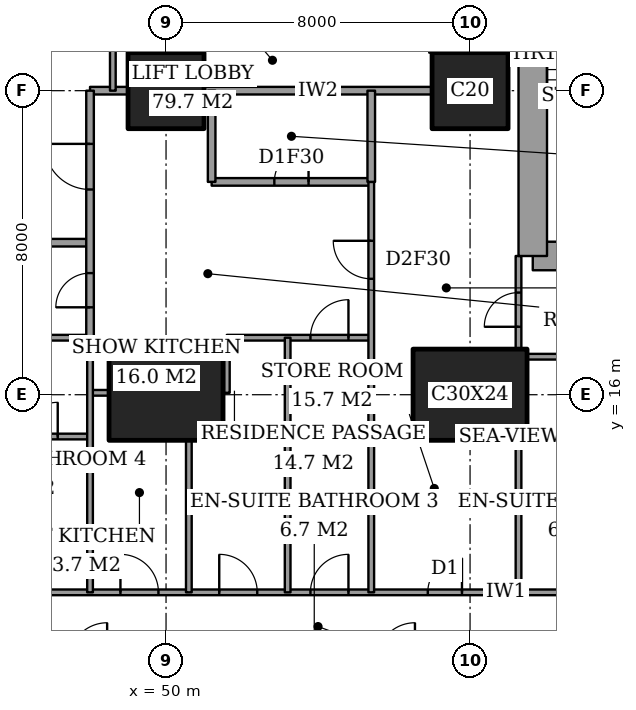
"""IFC4 building model, lengths in metres.
Left out: names, types, materials, properties, quantities, classifications, styles, units other than length and angle.
Written with IfcOpenShell. Run it as: python <this file> out.ifc"""

import sys

from ifc_helpers import new_model, si_unit, direction, frame, frame_2d, origin, origin_2d, place, context, subcontext, project, spatial, rectangle, extrude, element, fill, save


model = new_model("IFC4")
c1 = context("Model", 3, precision=1e-05, world=origin(), true_north=direction((0.0, 1.0)))
c2 = subcontext(c1, "Body", "Model", "MODEL_VIEW")
j1 = project(units=[si_unit("LENGTHUNIT", "METRE"), si_unit("PLANEANGLEUNIT", "RADIAN")], contexts=[c1])
p1 = place(None, origin())
s1 = spatial("IfcSite", under=j1, at=p1, CompositionType="ELEMENT")
p2 = place(p1, origin())
s2 = spatial("IfcBuilding", under=s1, at=p2, CompositionType="ELEMENT")
p3 = place(p2, frame((0.0, 0.0, 125.0)))
s3 = spatial("IfcBuildingStorey", under=s2, at=p3, CompositionType="ELEMENT", Elevation=125.0)
p4 = place(p3, frame((50.0, 16.0, 0.0), z_axis=(0.0, 0.0, 1.0), x_axis=(1.0, 0.0, 0.0)))
e1 = element("IfcColumn", 1, at=p4, inside=s3, PredefinedType="COLUMN", context=c2, shape_type="SweptSolid", body=[
    extrude(rectangle(XDim=3.0, YDim=2.4, at=origin_2d()), origin(), (0.0, 0.0, 1.0), 3.6),
])
p5 = place(p3, frame((50.0, 24.0, 0.0), z_axis=(0.0, 0.0, 1.0), x_axis=(1.0, 0.0, 0.0)))
e2 = element("IfcColumn", 2, at=p5, inside=s3, PredefinedType="COLUMN", context=c2, shape_type="SweptSolid", body=[
    extrude(rectangle(XDim=2.0, YDim=2.0, at=origin_2d()), origin(), (0.0, 0.0, 1.0), 3.6),
])
p6 = place(p3, frame((58.0, 16.0, 0.0), z_axis=(0.0, 0.0, 1.0), x_axis=(1.0, 0.0, 0.0)))
e3 = element("IfcColumn", 3, at=p6, inside=s3, PredefinedType="COLUMN", context=c2, shape_type="SweptSolid", body=[
    extrude(rectangle(XDim=3.0, YDim=2.4, at=origin_2d()), origin(), (0.0, 0.0, 1.0), 3.6),
])
p7 = place(p3, frame((58.0, 24.0, 0.0), z_axis=(0.0, 0.0, 1.0), x_axis=(1.0, 0.0, 0.0)))
e4 = element("IfcColumn", 4, at=p7, inside=s3, PredefinedType="COLUMN", context=c2, shape_type="SweptSolid", body=[
    extrude(rectangle(XDim=2.0, YDim=2.0, at=origin_2d()), origin(), (0.0, 0.0, 1.0), 3.6),
])
p8 = place(p3, frame((59.65, 19.65, 0.0), z_axis=(0.0, 0.0, 1.0), x_axis=(1.0, 0.0, 0.0)))
e5 = element("IfcWall", 5, at=p8, inside=s3, PredefinedType="SHEAR", context=c2, shape_type="SweptSolid", body=[
    extrude(rectangle(XDim=4.45, YDim=0.75, at=frame_2d((2.225, 0.0))), origin(), (0.0, 0.0, 1.0), 3.6),
])
p9 = place(p3, frame((59.65, 28.35, 0.0), z_axis=(0.0, 0.0, 1.0), x_axis=(0.0, -1.0, 0.0)))
e6 = element("IfcWall", 6, at=p9, inside=s3, PredefinedType="SHEAR", context=c2, shape_type="SweptSolid", body=[
    extrude(rectangle(XDim=8.7, YDim=0.75, at=frame_2d((4.35, 0.0))), origin(), (0.0, 0.0, 1.0), 3.6),
])
p10 = place(p9, frame((0.975, 0.0, 0.0)))
e7 = element("IfcOpeningElement", 7, at=p10, cuts=e6, PredefinedType="OPENING", context=c2, shape_type="SweptSolid", body=[
    extrude(rectangle(XDim=1.0, YDim=2.1, at=frame_2d((0.5, 1.05))), frame((0.0, 0.385, 0.0), z_axis=(0.0, -1.0, 0.0), x_axis=(1.0, 0.0, 0.0)), (0.0, 0.0, 1.0), 0.77),
])
p11 = place(p3, frame((41.439, 10.8, 0.0), z_axis=(0.0, 0.0, 1.0), x_axis=(1.0, 0.0, 0.0)))
e8 = element("IfcWall", 8, at=p11, inside=s3, PredefinedType="PARTITIONING", context=c2, shape_type="SweptSolid", body=[
    extrude(rectangle(XDim=25.011, YDim=0.15, at=frame_2d((12.505, 0.0))), origin(), (0.0, 0.0, 1.0), 3.35),
])
p12 = place(p11, frame((12.361, 0.0, 0.0)))
e9 = element("IfcOpeningElement", 9, at=p12, cuts=e8, PredefinedType="OPENING", context=c2, shape_type="SweptSolid", body=[
    extrude(rectangle(XDim=1.0, YDim=2.1, at=frame_2d((0.5, 1.05))), frame((0.0, 0.085, 0.0), z_axis=(0.0, -1.0, 0.0), x_axis=(1.0, 0.0, 0.0)), (0.0, 0.0, 1.0), 0.17),
])
p13 = place(p11, frame((20.924, 0.0, 0.0)))
e10 = element("IfcOpeningElement", 10, at=p13, cuts=e8, PredefinedType="OPENING", context=c2, shape_type="SweptSolid", body=[
    extrude(rectangle(XDim=1.0, YDim=2.1, at=frame_2d((0.5, 1.05))), frame((0.0, 0.085, 0.0), z_axis=(0.0, -1.0, 0.0), x_axis=(1.0, 0.0, 0.0)), (0.0, 0.0, 1.0), 0.17),
])
p14 = place(p11, frame((15.448, 0.0, 0.0)))
e11 = element("IfcOpeningElement", 11, at=p14, cuts=e8, PredefinedType="OPENING", context=c2, shape_type="SweptSolid", body=[
    extrude(rectangle(XDim=0.9, YDim=2.1, at=frame_2d((0.45, 1.05))), frame((0.0, 0.085, 0.0), z_axis=(0.0, -1.0, 0.0), x_axis=(1.0, 0.0, 0.0)), (0.0, 0.0, 1.0), 0.17),
])
p15 = place(p11, frame((9.961, 0.0, 0.0)))
e12 = element("IfcOpeningElement", 12, at=p15, cuts=e8, PredefinedType="OPENING", context=c2, shape_type="SweptSolid", body=[
    extrude(rectangle(XDim=1.0, YDim=2.1, at=frame_2d((0.5, 1.05))), frame((0.0, 0.085, 0.0), z_axis=(0.0, -1.0, 0.0), x_axis=(1.0, 0.0, 0.0)), (0.0, 0.0, 1.0), 0.17),
])
p16 = place(p11, frame((7.361, 0.0, 0.0)))
e13 = element("IfcOpeningElement", 13, at=p16, cuts=e8, PredefinedType="OPENING", context=c2, shape_type="SweptSolid", body=[
    extrude(rectangle(XDim=1.0, YDim=2.1, at=frame_2d((0.5, 1.05))), frame((0.0, 0.085, 0.0), z_axis=(0.0, -1.0, 0.0), x_axis=(1.0, 0.0, 0.0)), (0.0, 0.0, 1.0), 0.17),
])
p17 = place(p11, frame((2.836, 0.0, 0.0)))
e14 = element("IfcOpeningElement", 14, at=p17, cuts=e8, PredefinedType="OPENING", context=c2, shape_type="SweptSolid", body=[
    extrude(rectangle(XDim=1.0, YDim=2.1, at=frame_2d((0.5, 1.05))), frame((0.0, 0.085, 0.0), z_axis=(0.0, -1.0, 0.0), x_axis=(1.0, 0.0, 0.0)), (0.0, 0.0, 1.0), 0.17),
])
p18 = place(p3, frame((45.4, 14.9, 0.0), z_axis=(0.0, 0.0, 1.0), x_axis=(1.0, 0.0, 0.0)))
e15 = element("IfcWall", 15, at=p18, inside=s3, PredefinedType="PARTITIONING", context=c2, shape_type="SweptSolid", body=[
    extrude(rectangle(XDim=2.6, YDim=0.15, at=frame_2d((1.3, 0.0))), origin(), (0.0, 0.0, 1.0), 3.35),
])
p19 = place(p18, frame((0.85, 0.0, 0.0)))
e16 = element("IfcOpeningElement", 16, at=p19, cuts=e15, PredefinedType="OPENING", context=c2, shape_type="SweptSolid", body=[
    extrude(rectangle(XDim=0.9, YDim=2.1, at=frame_2d((0.45, 1.05))), frame((0.0, 0.085, 0.0), z_axis=(0.0, -1.0, 0.0), x_axis=(1.0, 0.0, 0.0)), (0.0, 0.0, 1.0), 0.17),
])
p20 = place(p3, frame((55.4, 15.0, 0.0), z_axis=(0.0, 0.0, 1.0), x_axis=(1.0, 0.0, 0.0)))
e17 = element("IfcWall", 17, at=p20, inside=s3, PredefinedType="PARTITIONING", context=c2, shape_type="SweptSolid", body=[
    extrude(rectangle(XDim=1.1, YDim=0.15, at=frame_2d((0.55, 0.0))), origin(), (0.0, 0.0, 1.0), 3.35),
])
p21 = place(p3, frame((48.0, 16.05, 0.0), z_axis=(0.0, 0.0, 1.0), x_axis=(1.0, 0.0, 0.0)))
e18 = element("IfcWall", 18, at=p21, inside=s3, PredefinedType="PARTITIONING", context=c2, shape_type="SweptSolid", body=[
    extrude(rectangle(XDim=0.5, YDim=0.15, at=frame_2d((0.25, 0.0))), origin(), (0.0, 0.0, 1.0), 2.634),
])
p22 = place(p3, frame((59.5, 17.0, 0.0), z_axis=(0.0, 0.0, 1.0), x_axis=(1.0, 0.0, 0.0)))
e19 = element("IfcWall", 19, at=p22, inside=s3, PredefinedType="PARTITIONING", context=c2, shape_type="SweptSolid", body=[
    extrude(rectangle(XDim=5.15, YDim=0.15, at=frame_2d((2.575, 0.0))), origin(), (0.0, 0.0, 1.0), 3.35),
])
p23 = place(p3, frame((42.0, 17.5, 0.0), z_axis=(0.0, 0.0, 1.0), x_axis=(1.0, 0.0, 0.0)))
e20 = element("IfcWall", 20, at=p23, inside=s3, PredefinedType="PARTITIONING", context=c2, shape_type="SweptSolid", body=[
    extrude(rectangle(XDim=6.0, YDim=0.15, at=frame_2d((3.0, 0.0))), origin(), (0.0, 0.0, 1.0), 3.35),
])
p24 = place(p3, frame((51.6, 17.5, 0.0), z_axis=(0.0, 0.0, 1.0), x_axis=(1.0, 0.0, 0.0)))
e21 = element("IfcWall", 21, at=p24, inside=s3, PredefinedType="PARTITIONING", context=c2, shape_type="SweptSolid", body=[
    extrude(rectangle(XDim=3.8, YDim=0.15, at=frame_2d((1.9, 0.0))), origin(), (0.0, 0.0, 1.0), 3.35),
])
p25 = place(p24, frame((2.2, 0.0, 0.0)))
e22 = element("IfcOpeningElement", 22, at=p25, cuts=e21, PredefinedType="OPENING", context=c2, shape_type="SweptSolid", body=[
    extrude(rectangle(XDim=1.0, YDim=2.1, at=frame_2d((0.5, 1.05))), frame((0.0, 0.085, 0.0), z_axis=(0.0, -1.0, 0.0), x_axis=(1.0, 0.0, 0.0)), (0.0, 0.0, 1.0), 0.17),
])
p26 = place(p3, frame((42.0, 20.0, 0.0), z_axis=(0.0, 0.0, 1.0), x_axis=(1.0, 0.0, 0.0)))
e23 = element("IfcWall", 23, at=p26, inside=s3, PredefinedType="PARTITIONING", context=c2, shape_type="SweptSolid", body=[
    extrude(rectangle(XDim=6.0, YDim=0.2, at=frame_2d((3.0, 0.0))), origin(), (0.0, 0.0, 1.0), 3.35),
])
p27 = place(p3, frame((51.2, 21.6, 0.0), z_axis=(0.0, 0.0, 1.0), x_axis=(1.0, 0.0, 0.0)))
e24 = element("IfcWall", 24, at=p27, inside=s3, PredefinedType="PARTITIONING", context=c2, shape_type="SweptSolid", body=[
    extrude(rectangle(XDim=4.2, YDim=0.2, at=frame_2d((2.1, 0.0))), origin(), (0.0, 0.0, 1.0), 3.35),
])
p28 = place(p27, frame((1.65, 0.0, 0.0)))
e25 = element("IfcOpeningElement", 25, at=p28, cuts=e24, PredefinedType="OPENING", context=c2, shape_type="SweptSolid", body=[
    extrude(rectangle(XDim=0.9, YDim=2.1, at=frame_2d((0.45, 1.05))), frame((0.0, 0.11, 0.0), z_axis=(0.0, -1.0, 0.0), x_axis=(1.0, 0.0, 0.0)), (0.0, 0.0, 1.0), 0.22),
])
p29 = place(p3, frame((48.0, 24.0, 0.0), z_axis=(0.0, 0.0, 1.0), x_axis=(1.0, 0.0, 0.0)))
e26 = element("IfcWall", 26, at=p29, inside=s3, PredefinedType="PARTITIONING", context=c2, shape_type="SweptSolid", body=[
    extrude(rectangle(XDim=1.0, YDim=0.2, at=frame_2d((0.5, 0.0))), origin(), (0.0, 0.0, 1.0), 3.35),
])
p30 = place(p3, frame((51.0, 24.0, 0.0), z_axis=(0.0, 0.0, 1.0), x_axis=(1.0, 0.0, 0.0)))
e27 = element("IfcWall", 27, at=p30, inside=s3, PredefinedType="PARTITIONING", context=c2, shape_type="SweptSolid", body=[
    extrude(rectangle(XDim=6.0, YDim=0.2, at=frame_2d((3.0, 0.0))), origin(), (0.0, 0.0, 1.0), 3.35),
])
p31 = place(p3, frame((48.0, 17.5, 0.0), z_axis=(0.0, 0.0, 1.0), x_axis=(0.0, 1.0, 0.0)))
e28 = element("IfcWall", 28, at=p31, inside=s3, PredefinedType="PARTITIONING", context=c2, shape_type="SweptSolid", body=[
    extrude(rectangle(XDim=6.5, YDim=0.2, at=frame_2d((3.25, 0.0))), origin(), (0.0, 0.0, 1.0), 3.35),
])
p32 = place(p31, frame((3.9, 0.0, 0.0)))
e29 = element("IfcOpeningElement", 29, at=p32, cuts=e28, PredefinedType="OPENING", context=c2, shape_type="SweptSolid", body=[
    extrude(rectangle(XDim=1.2, YDim=2.4, at=frame_2d((0.6, 1.2))), frame((0.0, 0.11, 0.0), z_axis=(0.0, -1.0, 0.0), x_axis=(1.0, 0.0, 0.0)), (0.0, 0.0, 1.0), 0.22),
])
p33 = place(p31, frame((0.8, 0.0, 0.0)))
e30 = element("IfcOpeningElement", 30, at=p33, cuts=e28, PredefinedType="OPENING", context=c2, shape_type="SweptSolid", body=[
    extrude(rectangle(XDim=0.9, YDim=2.1, at=frame_2d((0.45, 1.05))), frame((0.0, 0.11, 0.0), z_axis=(0.0, -1.0, 0.0), x_axis=(1.0, 0.0, 0.0)), (0.0, 0.0, 1.0), 0.22),
])
p34 = place(p3, frame((48.0, 10.8, 0.0), z_axis=(0.0, 0.0, 1.0), x_axis=(0.0, 1.0, 0.0)))
e31 = element("IfcWall", 31, at=p34, inside=s3, PredefinedType="PARTITIONING", context=c2, shape_type="SweptSolid", body=[
    extrude(rectangle(XDim=6.7, YDim=0.15, at=frame_2d((3.35, 0.0))), origin(), (0.0, 0.0, 1.0), 3.35),
])
p35 = place(p3, frame((48.6, 24.0, 0.0), z_axis=(0.0, 0.0, 1.0), x_axis=(0.0, 1.0, 0.0)))
e32 = element("IfcWall", 32, at=p35, inside=s3, PredefinedType="PARTITIONING", context=c2, shape_type="SweptSolid", body=[
    extrude(rectangle(XDim=1.6, YDim=0.15, at=frame_2d((0.8, 0.0))), origin(), (0.0, 0.0, 1.0), 3.35),
])
p36 = place(p3, frame((50.6, 10.8, 0.0), z_axis=(0.0, 0.0, 1.0), x_axis=(0.0, 1.0, 0.0)))
e33 = element("IfcWall", 33, at=p36, inside=s3, PredefinedType="PARTITIONING", context=c2, shape_type="SweptSolid", body=[
    extrude(rectangle(XDim=4.0, YDim=0.15, at=frame_2d((2.0, 0.0))), origin(), (0.0, 0.0, 1.0), 3.35),
])
p37 = place(p3, frame((51.2, 21.6, 0.0), z_axis=(0.0, 0.0, 1.0), x_axis=(0.0, 1.0, 0.0)))
e34 = element("IfcWall", 34, at=p37, inside=s3, PredefinedType="PARTITIONING", context=c2, shape_type="SweptSolid", body=[
    extrude(rectangle(XDim=2.4, YDim=0.2, at=frame_2d((1.2, 0.0))), origin(), (0.0, 0.0, 1.0), 3.35),
])
p38 = place(p3, frame((51.6, 16.05, 0.0), z_axis=(0.0, 0.0, 1.0), x_axis=(0.0, 1.0, 0.0)))
e35 = element("IfcWall", 35, at=p38, inside=s3, PredefinedType="PARTITIONING", context=c2, shape_type="SweptSolid", body=[
    extrude(rectangle(XDim=1.45, YDim=0.15, at=frame_2d((0.725, 0.0))), origin(), (0.0, 0.0, 1.0), 3.35),
])
p39 = place(p3, frame((53.2, 10.8, 0.0), z_axis=(0.0, 0.0, 1.0), x_axis=(0.0, 1.0, 0.0)))
e36 = element("IfcWall", 36, at=p39, inside=s3, PredefinedType="PARTITIONING", context=c2, shape_type="SweptSolid", body=[
    extrude(rectangle(XDim=6.7, YDim=0.15, at=frame_2d((3.35, 0.0))), origin(), (0.0, 0.0, 1.0), 3.35),
])
p40 = place(p3, frame((55.4, 21.6, 0.0), z_axis=(0.0, 0.0, 1.0), x_axis=(0.0, 1.0, 0.0)))
e37 = element("IfcWall", 37, at=p40, inside=s3, PredefinedType="PARTITIONING", context=c2, shape_type="SweptSolid", body=[
    extrude(rectangle(XDim=2.4, YDim=0.2, at=frame_2d((1.2, 0.0))), origin(), (0.0, 0.0, 1.0), 3.35),
])
p41 = place(p3, frame((55.4, 10.8, 0.0), z_axis=(0.0, 0.0, 1.0), x_axis=(0.0, 1.0, 0.0)))
e38 = element("IfcWall", 38, at=p41, inside=s3, PredefinedType="PARTITIONING", context=c2, shape_type="SweptSolid", body=[
    extrude(rectangle(XDim=10.8, YDim=0.15, at=frame_2d((5.4, 0.0))), origin(), (0.0, 0.0, 1.0), 3.35),
])
p42 = place(p41, frame((8.25, 0.0, 0.0)))
e39 = element("IfcOpeningElement", 39, at=p42, cuts=e38, PredefinedType="OPENING", context=c2, shape_type="SweptSolid", body=[
    extrude(rectangle(XDim=1.0, YDim=2.1, at=frame_2d((0.5, 1.05))), frame((0.0, 0.085, 0.0), z_axis=(0.0, -1.0, 0.0), x_axis=(1.0, 0.0, 0.0)), (0.0, 0.0, 1.0), 0.17),
])
p43 = place(p3, frame((59.275, 10.8, 0.0), z_axis=(0.0, 0.0, 1.0), x_axis=(0.0, 1.0, 0.0)))
e40 = element("IfcWall", 40, at=p43, inside=s3, PredefinedType="PARTITIONING", context=c2, shape_type="SweptSolid", body=[
    extrude(rectangle(XDim=4.0, YDim=0.15, at=frame_2d((2.0, 0.0))), origin(), (0.0, 0.0, 1.0), 3.35),
])
p44 = place(p3, frame((59.275, 17.2, 0.0), z_axis=(0.0, 0.0, 1.0), x_axis=(0.0, 1.0, 0.0)))
e41 = element("IfcWall", 41, at=p44, inside=s3, PredefinedType="PARTITIONING", context=c2, shape_type="SweptSolid", body=[
    extrude(rectangle(XDim=2.45, YDim=0.15, at=frame_2d((1.225, 0.0))), origin(), (0.0, 0.0, 1.0), 3.35),
])
p45 = place(p44, frame((0.587, 0.0, 0.0)))
e42 = element("IfcOpeningElement", 42, at=p45, cuts=e41, PredefinedType="OPENING", context=c2, shape_type="SweptSolid", body=[
    extrude(rectangle(XDim=0.9, YDim=2.1, at=frame_2d((0.45, 1.05))), frame((0.0, 0.085, 0.0), z_axis=(0.0, -1.0, 0.0), x_axis=(1.0, 0.0, 0.0)), (0.0, 0.0, 1.0), 0.17),
])
p46 = place(p12, origin())
e43 = element("IfcDoor", 43, at=p46, inside=s3, OperationType="SINGLE_SWING_LEFT", PredefinedType="DOOR", context=c2, shape_type="SweptSolid", body=[
    extrude(rectangle(XDim=1.0, YDim=2.1, at=frame_2d((0.5, 1.05))), frame((0.0, 0.025, 0.0), z_axis=(0.0, -1.0, 0.0), x_axis=(1.0, 0.0, 0.0)), (0.0, 0.0, 1.0), 0.05),
])
fill(e9, e43)
p47 = place(p45, origin())
e44 = element("IfcDoor", 44, at=p47, inside=s3, OperationType="SINGLE_SWING_RIGHT", PredefinedType="DOOR", context=c2, shape_type="SweptSolid", body=[
    extrude(rectangle(XDim=0.9, YDim=2.1, at=frame_2d((0.45, 1.05))), frame((0.0, 0.025, 0.0), z_axis=(0.0, -1.0, 0.0), x_axis=(1.0, 0.0, 0.0)), (0.0, 0.0, 1.0), 0.05),
])
fill(e42, e44)
p48 = place(p14, origin())
e45 = element("IfcDoor", 45, at=p48, inside=s3, OperationType="SINGLE_SWING_LEFT", PredefinedType="DOOR", context=c2, shape_type="SweptSolid", body=[
    extrude(rectangle(XDim=0.9, YDim=2.1, at=frame_2d((0.45, 1.05))), frame((0.0, 0.025, 0.0), z_axis=(0.0, -1.0, 0.0), x_axis=(1.0, 0.0, 0.0)), (0.0, 0.0, 1.0), 0.05),
])
fill(e11, e45)
p49 = place(p42, origin())
e46 = element("IfcDoor", 46, at=p49, inside=s3, OperationType="SINGLE_SWING_LEFT", PredefinedType="DOOR", context=c2, shape_type="SweptSolid", body=[
    extrude(rectangle(XDim=1.0, YDim=2.1, at=frame_2d((0.5, 1.05))), frame((0.0, 0.025, 0.0), z_axis=(0.0, -1.0, 0.0), x_axis=(1.0, 0.0, 0.0)), (0.0, 0.0, 1.0), 0.05),
])
fill(e39, e46)
p50 = place(p28, origin())
e47 = element("IfcDoor", 47, at=p50, inside=s3, OperationType="SINGLE_SWING_LEFT", PredefinedType="DOOR", context=c2, shape_type="SweptSolid", body=[
    extrude(rectangle(XDim=0.9, YDim=2.1, at=frame_2d((0.45, 1.05))), frame((0.0, 0.025, 0.0), z_axis=(0.0, -1.0, 0.0), x_axis=(1.0, 0.0, 0.0)), (0.0, 0.0, 1.0), 0.05),
])
fill(e25, e47)
p51 = place(p32, origin())
e48 = element("IfcDoor", 48, at=p51, inside=s3, OperationType="SINGLE_SWING_LEFT", PredefinedType="DOOR", context=c2, shape_type="SweptSolid", body=[
    extrude(rectangle(XDim=1.2, YDim=2.4, at=frame_2d((0.6, 1.2))), frame((0.0, 0.025, 0.0), z_axis=(0.0, -1.0, 0.0), x_axis=(1.0, 0.0, 0.0)), (0.0, 0.0, 1.0), 0.05),
])
fill(e29, e48)
p52 = place(p25, origin())
e49 = element("IfcDoor", 49, at=p52, inside=s3, OperationType="SINGLE_SWING_LEFT", PredefinedType="DOOR", context=c2, shape_type="SweptSolid", body=[
    extrude(rectangle(XDim=1.0, YDim=2.1, at=frame_2d((0.5, 1.05))), frame((0.0, 0.025, 0.0), z_axis=(0.0, -1.0, 0.0), x_axis=(1.0, 0.0, 0.0)), (0.0, 0.0, 1.0), 0.05),
])
fill(e22, e49)
p53 = place(p15, origin())
e50 = element("IfcDoor", 50, at=p53, inside=s3, OperationType="SINGLE_SWING_RIGHT", PredefinedType="DOOR", context=c2, shape_type="SweptSolid", body=[
    extrude(rectangle(XDim=1.0, YDim=2.1, at=frame_2d((0.5, 1.05))), frame((0.0, 0.025, 0.0), z_axis=(0.0, -1.0, 0.0), x_axis=(1.0, 0.0, 0.0)), (0.0, 0.0, 1.0), 0.05),
])
fill(e12, e50)
p54 = place(p16, origin())
e51 = element("IfcDoor", 51, at=p54, inside=s3, OperationType="SINGLE_SWING_RIGHT", PredefinedType="DOOR", context=c2, shape_type="SweptSolid", body=[
    extrude(rectangle(XDim=1.0, YDim=2.1, at=frame_2d((0.5, 1.05))), frame((0.0, 0.025, 0.0), z_axis=(0.0, -1.0, 0.0), x_axis=(1.0, 0.0, 0.0)), (0.0, 0.0, 1.0), 0.05),
])
fill(e13, e51)
p55 = place(p19, origin())
e52 = element("IfcDoor", 52, at=p55, inside=s3, OperationType="SINGLE_SWING_LEFT", PredefinedType="DOOR", context=c2, shape_type="SweptSolid", body=[
    extrude(rectangle(XDim=0.9, YDim=2.1, at=frame_2d((0.45, 1.05))), frame((0.0, 0.025, 0.0), z_axis=(0.0, -1.0, 0.0), x_axis=(1.0, 0.0, 0.0)), (0.0, 0.0, 1.0), 0.05),
])
fill(e16, e52)
p56 = place(p33, origin())
e53 = element("IfcDoor", 53, at=p56, inside=s3, OperationType="SINGLE_SWING_RIGHT", PredefinedType="DOOR", context=c2, shape_type="SweptSolid", body=[
    extrude(rectangle(XDim=0.9, YDim=2.1, at=frame_2d((0.45, 1.05))), frame((0.0, 0.025, 0.0), z_axis=(0.0, -1.0, 0.0), x_axis=(1.0, 0.0, 0.0)), (0.0, 0.0, 1.0), 0.05),
])
fill(e30, e53)
save(model, sys.argv[1])
